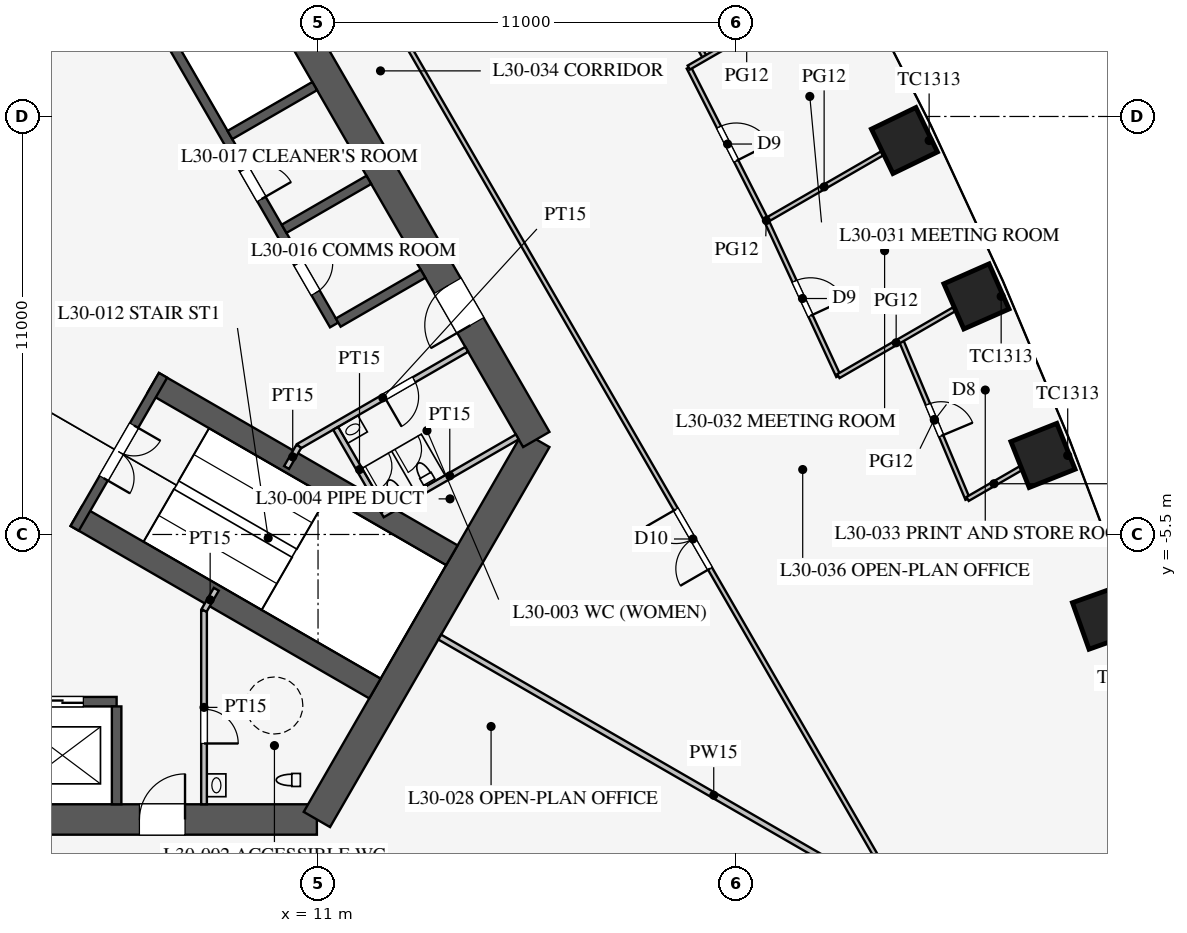
"""IFC4 building model, lengths in metres.
Left out: names, types, materials, properties, quantities, classifications, styles, units other than length and angle.
Written with IfcOpenShell. Run it as: python <this file> out.ifc"""

import sys

from ifc_helpers import new_model, si_unit, direction, frame, frame_2d, origin, origin_2d, place, context, subcontext, project, spatial, rectangle, extrude, element, fill, save


model = new_model("IFC4")
c1 = context("Model", 3, precision=1e-05, world=origin(), true_north=direction((0.0, 1.0)))
c2 = subcontext(c1, "Body", "Model", "MODEL_VIEW")
j1 = project(units=[si_unit("LENGTHUNIT", "METRE"), si_unit("PLANEANGLEUNIT", "RADIAN")], contexts=[c1])
p1 = place(None, origin())
s1 = spatial("IfcSite", under=j1, at=p1, CompositionType="ELEMENT")
p2 = place(p1, origin())
s2 = spatial("IfcBuilding", under=s1, at=p2, CompositionType="ELEMENT")
p3 = place(p2, frame((0.0, 0.0, 132.5)))
s3 = spatial("IfcBuildingStorey", under=s2, at=p3, CompositionType="ELEMENT", Elevation=132.5)
for number, where, z_axis, x_axis in (
    (1, (31.682, -7.689, 0.0), (0.0, 0.0, 1.0), (-0.336, 0.942, 0.0)),
    (2, (30.077, -3.42, 0.0), (0.0, 0.0, 1.0), (-0.37, 0.929, 0.0)),
    (3, (28.325, 0.765, 0.0), (0.0, 0.0, 1.0), (-0.403, 0.915, 0.0)),
    (4, (26.43, 4.867, 0.0), (0.0, 0.0, 1.0), (-0.436, 0.9, 0.0)),
):
    element("IfcColumn", number, at=place(p3, frame(where, z_axis=z_axis, x_axis=x_axis)), inside=s3, PredefinedType="COLUMN", context=c2, shape_type="SweptSolid", body=[
        extrude(rectangle(XDim=1.3, YDim=1.3, at=origin_2d()), origin(), (0.0, 0.0, 1.0), 4.2),
    ])
p4 = place(p3, frame((-10.97, -13.0, 0.0), z_axis=(0.0, 0.0, 1.0), x_axis=(1.0, 0.0, 0.0)))
e5 = element("IfcWall", 5, at=p4, inside=s3, PredefinedType="SHEAR", context=c2, shape_type="SweptSolid", body=[
    extrude(rectangle(XDim=21.939, YDim=0.8, at=frame_2d((10.97, 0.0))), origin(), (0.0, 0.0, 1.0), 4.2),
])
p5 = place(p4, frame((17.27, 0.0, 0.0)))
e6 = element("IfcOpeningElement", 6, at=p5, cuts=e5, PredefinedType="OPENING", context=c2, shape_type="SweptSolid", body=[
    extrude(rectangle(XDim=1.2, YDim=2.1, at=frame_2d((0.6, 1.05))), frame((0.0, 0.41, 0.0), z_axis=(0.0, -1.0, 0.0), x_axis=(1.0, 0.0, 0.0)), (0.0, 0.0, 1.0), 0.82),
])
p6 = place(p4, frame((3.47, 0.0, 0.0)))
e7 = element("IfcOpeningElement", 7, at=p6, cuts=e5, PredefinedType="OPENING", context=c2, shape_type="SweptSolid", body=[
    extrude(rectangle(XDim=1.2, YDim=2.1, at=frame_2d((0.6, 1.05))), frame((0.0, 0.41, 0.0), z_axis=(0.0, -1.0, 0.0), x_axis=(1.0, 0.0, 0.0)), (0.0, 0.0, 1.0), 0.82),
])
p7 = place(p3, frame((10.97, -13.0, 0.0), z_axis=(0.0, 0.0, 1.0), x_axis=(0.499995765644, 0.866027848477, 0.0)))
e8 = element("IfcWall", 8, at=p7, inside=s3, PredefinedType="SHEAR", context=c2, shape_type="SweptSolid", body=[
    extrude(rectangle(XDim=11.547, YDim=0.8, at=frame_2d((5.773, 0.0))), origin(), (0.0, 0.0, 1.0), 4.2),
])
p8 = place(p3, frame((16.743, -3.0, 0.0), z_axis=(0.0, 0.0, 1.0), x_axis=(-0.500002442456, 0.866023993627, 0.0)))
e9 = element("IfcWall", 9, at=p8, inside=s3, PredefinedType="SHEAR", context=c2, shape_type="SweptSolid", body=[
    extrude(rectangle(XDim=21.939, YDim=0.8, at=frame_2d((10.97, 0.0))), origin(), (0.0, 0.0, 1.0), 4.2),
])
p9 = place(p8, frame((17.27, 0.0, 0.0)))
e10 = element("IfcOpeningElement", 10, at=p9, cuts=e9, PredefinedType="OPENING", context=c2, shape_type="SweptSolid", body=[
    extrude(rectangle(XDim=1.2, YDim=2.1, at=frame_2d((0.6, 1.05))), frame((0.0, 0.41, 0.0), z_axis=(0.0, -1.0, 0.0), x_axis=(1.0, 0.0, 0.0)), (0.0, 0.0, 1.0), 0.82),
])
p10 = place(p8, frame((3.47, 0.0, 0.0)))
e11 = element("IfcOpeningElement", 11, at=p10, cuts=e9, PredefinedType="OPENING", context=c2, shape_type="SweptSolid", body=[
    extrude(rectangle(XDim=1.2, YDim=2.1, at=frame_2d((0.6, 1.05))), frame((0.0, 0.41, 0.0), z_axis=(0.0, -1.0, 0.0), x_axis=(1.0, 0.0, 0.0)), (0.0, 0.0, 1.0), 0.82),
])
p11 = place(p3, frame((-5.7, -9.9, 0.0), z_axis=(0.0, 0.0, 1.0), x_axis=(1.0, 0.0, 0.0)))
e12 = element("IfcWall", 12, at=p11, inside=s3, PredefinedType="SHEAR", context=c2, shape_type="SweptSolid", body=[
    extrude(rectangle(XDim=11.4, YDim=0.25, at=frame_2d((5.7, 0.0))), origin(), (0.0, 0.0, 1.0), 4.2),
])
p12 = place(p11, frame((0.875, 0.0, 0.0)))
e13 = element("IfcOpeningElement", 13, at=p12, cuts=e12, PredefinedType="OPENING", context=c2, shape_type="SweptSolid", body=[
    extrude(rectangle(XDim=1.1, YDim=2.2, at=frame_2d((0.55, 1.1))), frame((0.0, 0.135, 0.0), z_axis=(0.0, -1.0, 0.0), x_axis=(1.0, 0.0, 0.0)), (0.0, 0.0, 1.0), 0.27),
])
p13 = place(p11, frame((3.725, 0.0, 0.0)))
e14 = element("IfcOpeningElement", 14, at=p13, cuts=e12, PredefinedType="OPENING", context=c2, shape_type="SweptSolid", body=[
    extrude(rectangle(XDim=1.1, YDim=2.2, at=frame_2d((0.55, 1.1))), frame((0.0, 0.135, 0.0), z_axis=(0.0, -1.0, 0.0), x_axis=(1.0, 0.0, 0.0)), (0.0, 0.0, 1.0), 0.27),
])
p14 = place(p11, frame((6.575, 0.0, 0.0)))
e15 = element("IfcOpeningElement", 15, at=p14, cuts=e12, PredefinedType="OPENING", context=c2, shape_type="SweptSolid", body=[
    extrude(rectangle(XDim=1.1, YDim=2.2, at=frame_2d((0.55, 1.1))), frame((0.0, 0.135, 0.0), z_axis=(0.0, -1.0, 0.0), x_axis=(1.0, 0.0, 0.0)), (0.0, 0.0, 1.0), 0.27),
])
p15 = place(p11, frame((9.425, 0.0, 0.0)))
e16 = element("IfcOpeningElement", 16, at=p15, cuts=e12, PredefinedType="OPENING", context=c2, shape_type="SweptSolid", body=[
    extrude(rectangle(XDim=1.1, YDim=2.2, at=frame_2d((0.55, 1.1))), frame((0.0, 0.135, 0.0), z_axis=(0.0, -1.0, 0.0), x_axis=(1.0, 0.0, 0.0)), (0.0, 0.0, 1.0), 0.27),
])
p16 = place(p3, frame((5.7, -10.025, 0.0), z_axis=(0.0, 0.0, 1.0), x_axis=(0.0, -1.0, 0.0)))
e17 = element("IfcWall", 17, at=p16, inside=s3, PredefinedType="SHEAR", context=c2, shape_type="SweptSolid", body=[
    extrude(rectangle(XDim=2.575, YDim=0.25, at=frame_2d((1.288, 0.0))), origin(), (0.0, 0.0, 1.0), 4.2),
])
p17 = place(p3, frame((11.424, 0.014, 0.0), z_axis=(0.0, 0.0, 1.0), x_axis=(-0.500001763848, 0.866024385424, 0.0)))
e18 = element("IfcWall", 18, at=p17, inside=s3, PredefinedType="SHEAR", context=c2, shape_type="SweptSolid", body=[
    extrude(rectangle(XDim=11.4, YDim=0.25, at=frame_2d((5.7, 0.0))), origin(), (0.0, 0.0, 1.0), 4.2),
])
p18 = place(p17, frame((0.975, 0.0, 0.0)))
e19 = element("IfcOpeningElement", 19, at=p18, cuts=e18, PredefinedType="OPENING", context=c2, shape_type="SweptSolid", body=[
    extrude(rectangle(XDim=0.9, YDim=2.1, at=frame_2d((0.45, 1.05))), frame((0.0, 0.135, 0.0), z_axis=(0.0, -1.0, 0.0), x_axis=(1.0, 0.0, 0.0)), (0.0, 0.0, 1.0), 0.27),
])
p19 = place(p17, frame((3.825, 0.0, 0.0)))
e20 = element("IfcOpeningElement", 20, at=p19, cuts=e18, PredefinedType="OPENING", context=c2, shape_type="SweptSolid", body=[
    extrude(rectangle(XDim=0.9, YDim=2.1, at=frame_2d((0.45, 1.05))), frame((0.0, 0.135, 0.0), z_axis=(0.0, -1.0, 0.0), x_axis=(1.0, 0.0, 0.0)), (0.0, 0.0, 1.0), 0.27),
])
for number, where, z_axis, x_axis in (
    (21, (11.532, 0.076, 0.0), (0.0, 0.0, 1.0), (0.866, 0.5, 0.0)),
    (22, (10.107, 2.544, 0.0), (0.0, 0.0, 1.0), (0.866, 0.5, 0.0)),
    (23, (8.682, 5.012, 0.0), (0.0, 0.0, 1.0), (0.866, 0.5, 0.0)),
):
    element("IfcWall", number, at=place(p3, frame(where, z_axis=z_axis, x_axis=x_axis)), inside=s3, PredefinedType="SHEAR", context=c2, shape_type="SweptSolid", body=[
        extrude(rectangle(XDim=2.575, YDim=0.25, at=frame_2d((1.288, 0.0))), origin(), (0.0, 0.0, 1.0), 4.2),
    ])
for number, where, z_axis, x_axis in (
    (24, (4.638, -5.016, 0.0), (0.0, 0.0, 1.0), (0.866, -0.5, 0.0)),
    (25, (6.663, -1.509, 0.0), (0.0, 0.0, 1.0), (0.866, -0.5, 0.0)),
):
    element("IfcWall", number, at=place(p3, frame(where, z_axis=z_axis, x_axis=x_axis)), inside=s3, PredefinedType="SHEAR", context=c2, shape_type="SweptSolid", body=[
        extrude(rectangle(XDim=9.075, YDim=0.6, at=frame_2d((4.538, 0.0))), origin(), (0.0, 0.0, 1.0), 4.2),
    ])
p20 = place(p3, frame((4.597, -5.339, 0.0), z_axis=(0.0, 0.0, 1.0), x_axis=(0.499984536904, 0.866034331223, 0.0)))
e26 = element("IfcWall", 26, at=p20, inside=s3, PredefinedType="SHEAR", context=c2, shape_type="SweptSolid", body=[
    extrude(rectangle(XDim=4.65, YDim=0.25, at=frame_2d((2.325, 0.0))), origin(), (0.0, 0.0, 1.0), 4.2),
])
p21 = place(p20, frame((1.525, 0.0, 0.0)))
e27 = element("IfcOpeningElement", 27, at=p21, cuts=e26, PredefinedType="OPENING", context=c2, shape_type="SweptSolid", body=[
    extrude(rectangle(XDim=1.6, YDim=2.1, at=frame_2d((0.8, 1.05))), frame((0.0, 0.135, 0.0), z_axis=(0.0, -1.0, 0.0), x_axis=(1.0, 0.0, 0.0)), (0.0, 0.0, 1.0), 0.27),
])
p22 = place(p3, frame((8.0, -7.5, 0.0), z_axis=(0.0, 0.0, 1.0), x_axis=(0.0, -1.0, 0.0)))
e28 = element("IfcWall", 28, at=p22, inside=s3, PredefinedType="PARTITIONING", context=c2, shape_type="SweptSolid", body=[
    extrude(rectangle(XDim=5.1, YDim=0.15, at=frame_2d((2.55, 0.0))), origin(), (0.0, 0.0, 1.0), 4.0),
])
p23 = place(p22, frame((2.6, 0.0, 0.0)))
e29 = element("IfcOpeningElement", 29, at=p23, cuts=e28, PredefinedType="OPENING", context=c2, shape_type="SweptSolid", body=[
    extrude(rectangle(XDim=0.9, YDim=2.1, at=frame_2d((0.45, 1.05))), frame((0.0, 0.085, 0.0), z_axis=(0.0, -1.0, 0.0), x_axis=(1.0, 0.0, 0.0)), (0.0, 0.0, 1.0), 0.17),
])
p24 = place(p3, frame((10.495, -3.178, 0.0), z_axis=(0.0, 0.0, 1.0), x_axis=(0.86602216432, 0.500005610874, 0.0)))
e30 = element("IfcWall", 30, at=p24, inside=s3, PredefinedType="PARTITIONING", context=c2, shape_type="SweptSolid", body=[
    extrude(rectangle(XDim=5.1, YDim=0.15, at=frame_2d((2.55, 0.0))), origin(), (0.0, 0.0, 1.0), 4.0),
])
p25 = place(p24, frame((2.6, 0.0, 0.0)))
e31 = element("IfcOpeningElement", 31, at=p25, cuts=e30, PredefinedType="OPENING", context=c2, shape_type="SweptSolid", body=[
    extrude(rectangle(XDim=0.9, YDim=2.1, at=frame_2d((0.45, 1.05))), frame((0.0, 0.085, 0.0), z_axis=(0.0, -1.0, 0.0), x_axis=(1.0, 0.0, 0.0)), (0.0, 0.0, 1.0), 0.17),
])
for number, where, z_axis, x_axis in (
    (32, (8.0, -7.5, 0.0), (0.0, 0.0, 1.0), (0.5, 0.866, 0.0)),
    (33, (10.495, -3.178, 0.0), (0.0, 0.0, 1.0), (-0.5, -0.866, 0.0)),
):
    element("IfcWall", number, at=place(p3, frame(where, z_axis=z_axis, x_axis=x_axis)), inside=s3, PredefinedType="PARTITIONING", context=c2, shape_type="SweptSolid", body=[
        extrude(rectangle(XDim=0.645, YDim=0.15, at=frame_2d((0.323, 0.0))), origin(), (0.0, 0.0, 1.0), 4.0),
    ])
p26 = place(p3, frame((12.691, -4.982, 0.0), z_axis=(0.0, 0.0, 1.0), x_axis=(0.8660249478, 0.500000789788, 0.0)))
e34 = element("IfcWall", 34, at=p26, inside=s3, PredefinedType="PARTITIONING", context=c2, shape_type="SweptSolid", body=[
    extrude(rectangle(XDim=4.1, YDim=0.15, at=frame_2d((2.05, 0.0))), origin(), (0.0, 0.0, 1.0), 4.0),
])
p27 = place(p3, frame((11.464, -2.706, 0.0), z_axis=(0.0, 0.0, 1.0), x_axis=(0.50001992892, -0.866013897511, 0.0)))
e35 = element("IfcWall", 35, at=p27, inside=s3, PredefinedType="PARTITIONING", context=c2, shape_type="SweptSolid", body=[
    extrude(rectangle(XDim=2.51, YDim=0.15, at=frame_2d((1.255, 0.0))), origin(), (0.0, 0.0, 1.0), 4.0),
])
p28 = place(p3, frame((14.203, -8.2, 0.0), z_axis=(0.0, 0.0, 1.0), x_axis=(0.866024668836, -0.500001272966, 0.0)))
e36 = element("IfcWall", 36, at=p28, inside=s3, PredefinedType="PARTITIONING", context=c2, shape_type="SweptSolid", body=[
    extrude(rectangle(XDim=16.65, YDim=0.15, at=frame_2d((8.325, 0.0))), origin(), (0.0, 0.0, 1.0), 2.3),
])
p29 = place(p3, frame((26.415, -15.231, 0.0), z_axis=(0.0, 0.0, 1.0), x_axis=(-0.50000091641, 0.866024874695, 0.0)))
e37 = element("IfcWall", 37, at=p29, inside=s3, PredefinedType="PARTITIONING", context=c2, shape_type="SweptSolid", body=[
    extrude(rectangle(XDim=52.796, YDim=0.12, at=frame_2d((26.398, 0.0))), origin(), (0.0, 0.0, 1.0), 2.9),
])
p30 = place(p29, frame((10.2, 0.0, 0.15)))
e38 = element("IfcOpeningElement", 38, at=p30, cuts=e37, PredefinedType="OPENING", context=c2, shape_type="SweptSolid", body=[
    extrude(rectangle(XDim=1.8, YDim=2.1, at=frame_2d((0.9, 1.05))), frame((0.0, 0.07, 0.0), z_axis=(0.0, -1.0, 0.0), x_axis=(1.0, 0.0, 0.0)), (0.0, 0.0, 1.0), 0.14),
])
p31 = place(p29, frame((40.8, 0.0, 0.15)))
e39 = element("IfcOpeningElement", 39, at=p31, cuts=e37, PredefinedType="OPENING", context=c2, shape_type="SweptSolid", body=[
    extrude(rectangle(XDim=1.8, YDim=2.1, at=frame_2d((0.9, 1.05))), frame((0.0, 0.07, 0.0), z_axis=(0.0, -1.0, 0.0), x_axis=(1.0, 0.0, 0.0)), (0.0, 0.0, 1.0), 0.14),
])
p32 = place(p3, frame((24.692, -1.333, 0.0), z_axis=(0.0, 0.0, 1.0), x_axis=(-0.41992827805, 0.90755729367, 0.0)))
e40 = element("IfcWall", 40, at=p32, inside=s3, PredefinedType="PARTITIONING", context=c2, shape_type="SweptSolid", body=[
    extrude(rectangle(XDim=4.519, YDim=0.12, at=frame_2d((2.259, 0.0))), origin(), (0.0, 0.0, 1.0), 2.9),
])
p33 = place(p32, frame((1.75, 0.0, 0.15)))
e41 = element("IfcOpeningElement", 41, at=p33, cuts=e40, PredefinedType="OPENING", context=c2, shape_type="SweptSolid", body=[
    extrude(rectangle(XDim=1.0, YDim=2.1, at=frame_2d((0.5, 1.05))), frame((0.0, 0.07, 0.0), z_axis=(0.0, -1.0, 0.0), x_axis=(1.0, 0.0, 0.0)), (0.0, 0.0, 1.0), 0.14),
])
p34 = place(p3, frame((28.092, -4.566, 0.0), z_axis=(0.0, 0.0, 1.0), x_axis=(-0.386742917128, 0.92218757097, 0.0)))
e42 = element("IfcWall", 42, at=p34, inside=s3, PredefinedType="PARTITIONING", context=c2, shape_type="SweptSolid", body=[
    extrude(rectangle(XDim=4.536, YDim=0.12, at=frame_2d((2.268, 0.0))), origin(), (0.0, 0.0, 1.0), 2.9),
])
p35 = place(p34, frame((1.8, 0.0, 0.15)))
e43 = element("IfcOpeningElement", 43, at=p35, cuts=e42, PredefinedType="OPENING", context=c2, shape_type="SweptSolid", body=[
    extrude(rectangle(XDim=0.9, YDim=2.1, at=frame_2d((0.45, 1.05))), frame((0.0, 0.07, 0.0), z_axis=(0.0, -1.0, 0.0), x_axis=(1.0, 0.0, 0.0)), (0.0, 0.0, 1.0), 0.14),
])
p36 = place(p3, frame((21.189, 7.037, 0.0), z_axis=(0.0, 0.0, 1.0), x_axis=(-0.484292898211, 0.874905931368, 0.0)))
e44 = element("IfcWall", 44, at=p36, inside=s3, PredefinedType="PARTITIONING", context=c2, shape_type="SweptSolid", body=[
    extrude(rectangle(XDim=4.501, YDim=0.12, at=frame_2d((2.25, 0.0))), origin(), (0.0, 0.0, 1.0), 2.9),
])
p37 = place(p36, frame((1.75, 0.0, 0.15)))
e45 = element("IfcOpeningElement", 45, at=p37, cuts=e44, PredefinedType="OPENING", context=c2, shape_type="SweptSolid", body=[
    extrude(rectangle(XDim=1.0, YDim=2.1, at=frame_2d((0.5, 1.05))), frame((0.0, 0.07, 0.0), z_axis=(0.0, -1.0, 0.0), x_axis=(1.0, 0.0, 0.0)), (0.0, 0.0, 1.0), 0.14),
])
p38 = place(p3, frame((22.795, 2.768, 0.0), z_axis=(0.0, 0.0, 1.0), x_axis=(-0.452471679136, 0.891778772779, 0.0)))
e46 = element("IfcWall", 46, at=p38, inside=s3, PredefinedType="PARTITIONING", context=c2, shape_type="SweptSolid", body=[
    extrude(rectangle(XDim=4.507, YDim=0.12, at=frame_2d((2.253, 0.0))), origin(), (0.0, 0.0, 1.0), 2.9),
])
p39 = place(p38, frame((1.75, 0.0, 0.15)))
e47 = element("IfcOpeningElement", 47, at=p39, cuts=e46, PredefinedType="OPENING", context=c2, shape_type="SweptSolid", body=[
    extrude(rectangle(XDim=1.0, YDim=2.1, at=frame_2d((0.5, 1.05))), frame((0.0, 0.07, 0.0), z_axis=(0.0, -1.0, 0.0), x_axis=(1.0, 0.0, 0.0)), (0.0, 0.0, 1.0), 0.14),
])
p40 = place(p3, frame((24.692, -1.333, 0.0), z_axis=(0.0, 0.0, 1.0), x_axis=(0.86600959659, 0.500027377864, 0.0)))
e48 = element("IfcWall", 48, at=p40, inside=s3, PredefinedType="PARTITIONING", context=c2, shape_type="SweptSolid", body=[
    extrude(rectangle(XDim=3.511, YDim=0.12, at=frame_2d((1.756, 0.0))), origin(), (0.0, 0.0, 1.0), 2.9),
])
p41 = place(p3, frame((28.092, -4.566, 0.0), z_axis=(0.0, 0.0, 1.0), x_axis=(0.866005660673, 0.500034194513, 0.0)))
e49 = element("IfcWall", 49, at=p41, inside=s3, PredefinedType="PARTITIONING", context=c2, shape_type="SweptSolid", body=[
    extrude(rectangle(XDim=1.604, YDim=0.12, at=frame_2d((0.802, 0.0))), origin(), (0.0, 0.0, 1.0), 2.9),
])
p42 = place(p3, frame((20.756, 6.787, 0.0), z_axis=(0.0, 0.0, 1.0), x_axis=(0.866027308682, 0.499996700606, 0.0)))
e50 = element("IfcWall", 50, at=p42, inside=s3, PredefinedType="PARTITIONING", context=c2, shape_type="SweptSolid", body=[
    extrude(rectangle(XDim=3.519, YDim=0.12, at=frame_2d((1.76, 0.0))), origin(), (0.0, 0.0, 1.0), 2.9),
])
p43 = place(p3, frame((22.795, 2.768, 0.0), z_axis=(0.0, 0.0, 1.0), x_axis=(0.866034119795, 0.499984903122, 0.0)))
e51 = element("IfcWall", 51, at=p43, inside=s3, PredefinedType="PARTITIONING", context=c2, shape_type="SweptSolid", body=[
    extrude(rectangle(XDim=3.516, YDim=0.12, at=frame_2d((1.758, 0.0))), origin(), (0.0, 0.0, 1.0), 2.9),
])
p44 = place(p23, origin())
e52 = element("IfcDoor", 52, at=p44, inside=s3, OperationType="SINGLE_SWING_RIGHT", PredefinedType="DOOR", context=c2, shape_type="SweptSolid", body=[
    extrude(rectangle(XDim=0.9, YDim=2.1, at=frame_2d((0.45, 1.05))), frame((0.0, 0.025, 0.0), z_axis=(0.0, -1.0, 0.0), x_axis=(1.0, 0.0, 0.0)), (0.0, 0.0, 1.0), 0.05),
])
fill(e29, e52)
p45 = place(p25, frame((0.9, 0.0, 0.0), z_axis=(0.0, 0.0, 1.0), x_axis=(-1.0, 0.0, 0.0)))
e53 = element("IfcDoor", 53, at=p45, inside=s3, OperationType="SINGLE_SWING_RIGHT", PredefinedType="DOOR", context=c2, shape_type="SweptSolid", body=[
    extrude(rectangle(XDim=0.9, YDim=2.1, at=frame_2d((0.45, 1.05))), frame((0.0, 0.025, 0.0), z_axis=(0.0, -1.0, 0.0), x_axis=(1.0, 0.0, 0.0)), (0.0, 0.0, 1.0), 0.05),
])
fill(e31, e53)
p46 = place(p21, frame((1.6, 0.0, 0.0), z_axis=(0.0, 0.0, 1.0), x_axis=(-1.0, 0.0, 0.0)))
e54 = element("IfcDoor", 54, at=p46, inside=s3, OperationType="DOUBLE_DOOR_SINGLE_SWING", PredefinedType="DOOR", context=c2, shape_type="SweptSolid", body=[
    extrude(rectangle(XDim=1.6, YDim=2.1, at=frame_2d((0.8, 1.05))), frame((0.0, 0.025, 0.0), z_axis=(0.0, -1.0, 0.0), x_axis=(1.0, 0.0, 0.0)), (0.0, 0.0, 1.0), 0.05),
])
fill(e27, e54)
p47 = place(p5, origin())
e55 = element("IfcDoor", 55, at=p47, inside=s3, OperationType="SINGLE_SWING_RIGHT", PredefinedType="DOOR", context=c2, shape_type="SweptSolid", body=[
    extrude(rectangle(XDim=1.2, YDim=2.1, at=frame_2d((0.6, 1.05))), frame((0.0, 0.025, 0.0), z_axis=(0.0, -1.0, 0.0), x_axis=(1.0, 0.0, 0.0)), (0.0, 0.0, 1.0), 0.05),
])
fill(e6, e55)
p48 = place(p10, origin())
e56 = element("IfcDoor", 56, at=p48, inside=s3, OperationType="SINGLE_SWING_LEFT", PredefinedType="DOOR", context=c2, shape_type="SweptSolid", body=[
    extrude(rectangle(XDim=1.2, YDim=2.1, at=frame_2d((0.6, 1.05))), frame((0.0, 0.025, 0.0), z_axis=(0.0, -1.0, 0.0), x_axis=(1.0, 0.0, 0.0)), (0.0, 0.0, 1.0), 0.05),
])
fill(e11, e56)
p49 = place(p18, frame((0.9, 0.0, 0.0), z_axis=(0.0, 0.0, 1.0), x_axis=(-1.0, 0.0, 0.0)))
e57 = element("IfcDoor", 57, at=p49, inside=s3, OperationType="SINGLE_SWING_LEFT", PredefinedType="DOOR", context=c2, shape_type="SweptSolid", body=[
    extrude(rectangle(XDim=0.9, YDim=2.1, at=frame_2d((0.45, 1.05))), frame((0.0, 0.025, 0.0), z_axis=(0.0, -1.0, 0.0), x_axis=(1.0, 0.0, 0.0)), (0.0, 0.0, 1.0), 0.05),
])
fill(e19, e57)
p50 = place(p19, frame((0.9, 0.0, 0.0), z_axis=(0.0, 0.0, 1.0), x_axis=(-1.0, 0.0, 0.0)))
e58 = element("IfcDoor", 58, at=p50, inside=s3, OperationType="SINGLE_SWING_RIGHT", PredefinedType="DOOR", context=c2, shape_type="SweptSolid", body=[
    extrude(rectangle(XDim=0.9, YDim=2.1, at=frame_2d((0.45, 1.05))), frame((0.0, 0.025, 0.0), z_axis=(0.0, -1.0, 0.0), x_axis=(1.0, 0.0, 0.0)), (0.0, 0.0, 1.0), 0.05),
])
fill(e20, e58)
p51 = place(p39, frame((1.0, 0.0, 0.0), z_axis=(0.0, 0.0, 1.0), x_axis=(-1.0, 0.0, 0.0)))
e59 = element("IfcDoor", 59, at=p51, inside=s3, OperationType="SINGLE_SWING_RIGHT", PredefinedType="DOOR", context=c2, shape_type="SweptSolid", body=[
    extrude(rectangle(XDim=1.0, YDim=2.1, at=frame_2d((0.5, 1.05))), frame((0.0, 0.025, 0.0), z_axis=(0.0, -1.0, 0.0), x_axis=(1.0, 0.0, 0.0)), (0.0, 0.0, 1.0), 0.05),
])
fill(e47, e59)
p52 = place(p33, frame((1.0, 0.0, 0.0), z_axis=(0.0, 0.0, 1.0), x_axis=(-1.0, 0.0, 0.0)))
e60 = element("IfcDoor", 60, at=p52, inside=s3, OperationType="SINGLE_SWING_RIGHT", PredefinedType="DOOR", context=c2, shape_type="SweptSolid", body=[
    extrude(rectangle(XDim=1.0, YDim=2.1, at=frame_2d((0.5, 1.05))), frame((0.0, 0.025, 0.0), z_axis=(0.0, -1.0, 0.0), x_axis=(1.0, 0.0, 0.0)), (0.0, 0.0, 1.0), 0.05),
])
fill(e41, e60)
p53 = place(p35, frame((0.9, 0.0, 0.0), z_axis=(0.0, 0.0, 1.0), x_axis=(-1.0, 0.0, 0.0)))
e61 = element("IfcDoor", 61, at=p53, inside=s3, OperationType="SINGLE_SWING_RIGHT", PredefinedType="DOOR", context=c2, shape_type="SweptSolid", body=[
    extrude(rectangle(XDim=0.9, YDim=2.1, at=frame_2d((0.45, 1.05))), frame((0.0, 0.025, 0.0), z_axis=(0.0, -1.0, 0.0), x_axis=(1.0, 0.0, 0.0)), (0.0, 0.0, 1.0), 0.05),
])
fill(e43, e61)
p54 = place(p30, origin())
e62 = element("IfcDoor", 62, at=p54, inside=s3, OperationType="DOUBLE_DOOR_SINGLE_SWING", PredefinedType="DOOR", context=c2, shape_type="SweptSolid", body=[
    extrude(rectangle(XDim=1.8, YDim=2.1, at=frame_2d((0.9, 1.05))), frame((0.0, 0.025, 0.0), z_axis=(0.0, -1.0, 0.0), x_axis=(1.0, 0.0, 0.0)), (0.0, 0.0, 1.0), 0.05),
])
fill(e38, e62)
p55 = place(p15, origin())
e63 = element("IfcDoor", 63, at=p55, inside=s3, OperationType="DOUBLE_DOOR_SLIDING", PredefinedType="DOOR", context=c2, shape_type="SweptSolid", body=[
    extrude(rectangle(XDim=1.1, YDim=2.2, at=frame_2d((0.55, 1.1))), frame((0.0, 0.025, 0.0), z_axis=(0.0, -1.0, 0.0), x_axis=(1.0, 0.0, 0.0)), (0.0, 0.0, 1.0), 0.05),
])
fill(e16, e63)
save(model, sys.argv[1])
